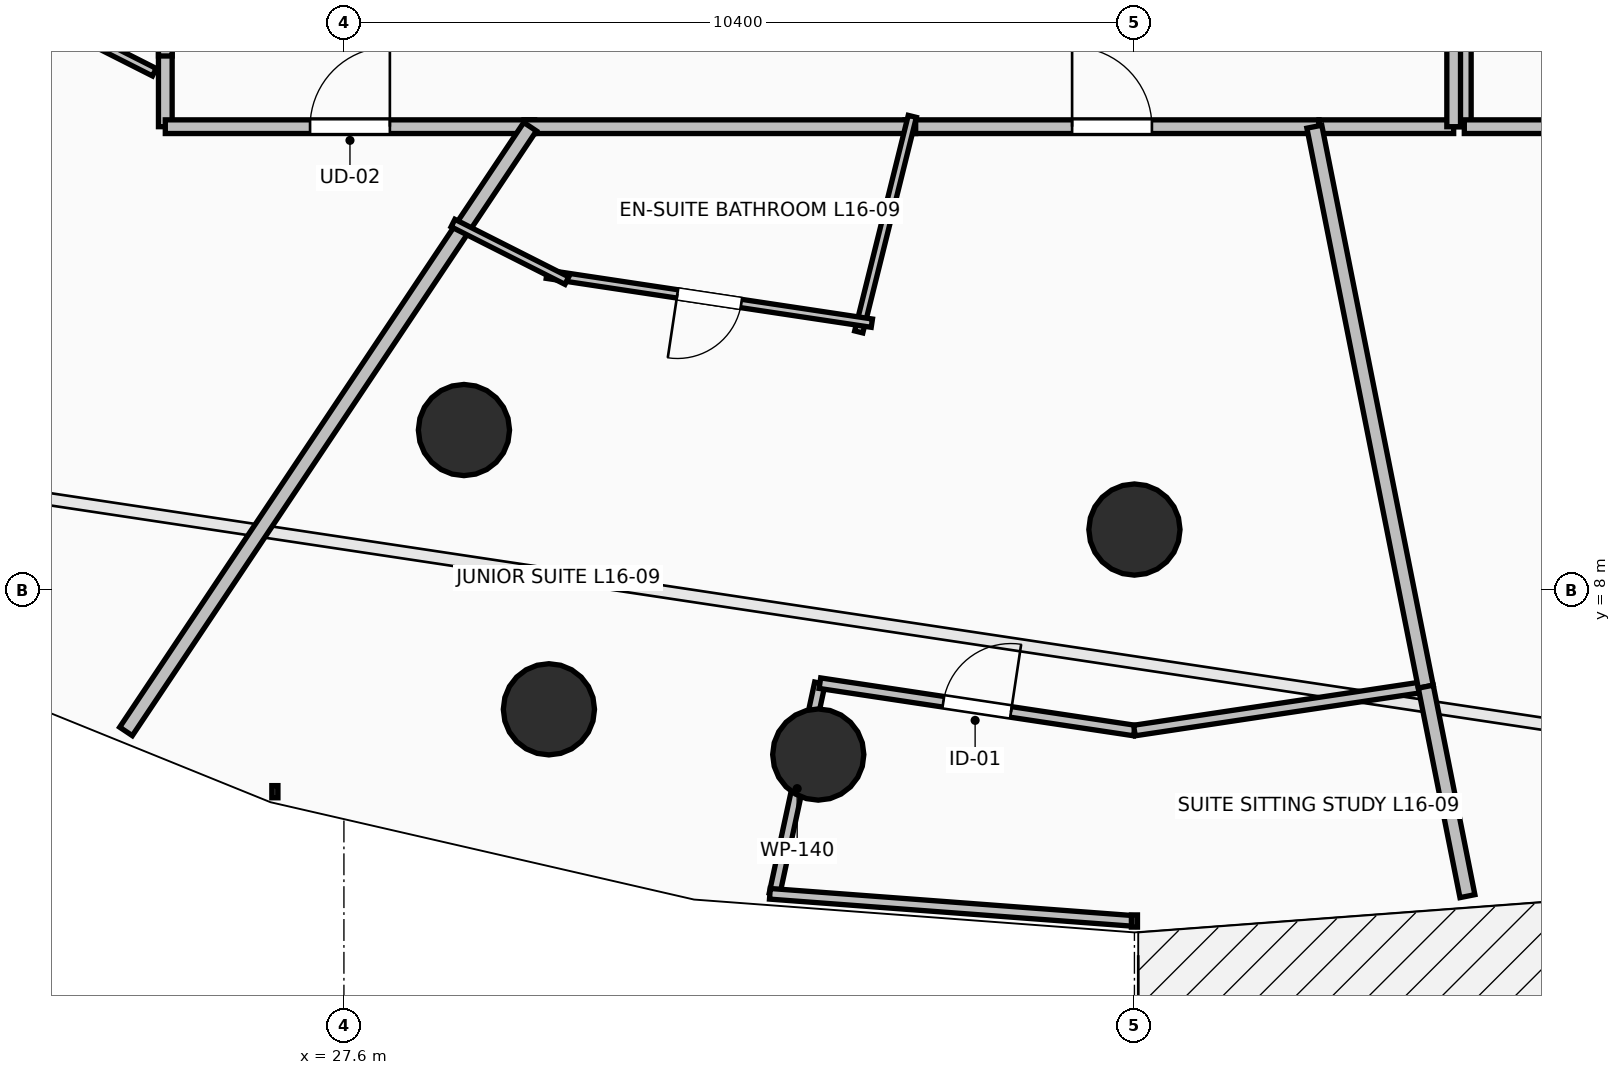
"""IFC4 building model, lengths in metres.
Left out: names, types, materials, properties, quantities, classifications, styles, units other than length and angle.
Written with IfcOpenShell. Run it as: python <this file> out.ifc"""

import sys

from ifc_helpers import new_model, si_unit, direction, frame, frame_2d, origin, origin_2d, place, context, subcontext, project, spatial, rectangle, circle, extrude, element, fill, save


model = new_model("IFC4")
c1 = context("Model", 3, precision=1e-05, world=origin(), true_north=direction((0.0, 1.0)))
c2 = subcontext(c1, "Body", "Model", "MODEL_VIEW")
j1 = project(units=[si_unit("LENGTHUNIT", "METRE"), si_unit("PLANEANGLEUNIT", "RADIAN")], contexts=[c1])
p1 = place(None, origin())
s1 = spatial("IfcSite", under=j1, at=p1, CompositionType="ELEMENT")
p2 = place(p1, origin())
s2 = spatial("IfcBuilding", under=s1, at=p2, CompositionType="ELEMENT")
p3 = place(p2, frame((0.0, 0.0, 62.5)))
s3 = spatial("IfcBuildingStorey", under=s2, at=p3, CompositionType="ELEMENT", Elevation=62.5)
for number, where, z_axis, x_axis in (
    (1, (29.179, 10.109, 0.0), (0.0, 0.0, 1.0), (-0.383, -0.924, 0.0)),
    (2, (38.0, 8.8, 0.0), (0.0, 0.0, 1.0), (0.0, -1.0, 0.0)),
    (3, (30.297, 6.435, 0.0), (0.0, 0.0, 1.0), (-0.383, -0.924, 0.0)),
    (4, (33.84, 5.84, 0.0), (0.0, 0.0, 1.0), (0.0, -1.0, 0.0)),
):
    element("IfcColumn", number, at=place(p3, frame(where, z_axis=z_axis, x_axis=x_axis)), inside=s3, PredefinedType="COLUMN", context=c2, shape_type="SweptSolid", body=[
        extrude(circle(Radius=0.6, at=origin_2d()), origin(), (0.0, 0.0, 1.0), 3.5),
    ])
p4 = place(p3, frame((25.25, 15.17, 0.0), z_axis=(0.0, 0.0, 1.0), x_axis=(0.0, -1.0, 0.0)))
e5 = element("IfcWall", 5, at=p4, inside=s3, PredefinedType="PARTITIONING", context=c2, shape_type="SweptSolid", body=[
    extrude(rectangle(XDim=1.07, YDim=0.18, at=frame_2d((0.535, 0.0))), origin(), (0.0, 0.0, 1.0), 2.874),
])
p5 = place(p3, frame((25.25, 14.1, 0.0), z_axis=(0.0, 0.0, 1.0), x_axis=(1.0, 0.0, 0.0)))
e6 = element("IfcWall", 6, at=p5, inside=s3, PredefinedType="PARTITIONING", context=c2, shape_type="SweptSolid", body=[
    extrude(rectangle(XDim=4.859, YDim=0.18, at=frame_2d((2.429, 0.0))), origin(), (0.0, 0.0, 1.0), 2.432),
])
p6 = place(p5, frame((1.905, 0.0, 0.0)))
e7 = element("IfcOpeningElement", 7, at=p6, cuts=e6, PredefinedType="OPENING", context=c2, shape_type="SweptSolid", body=[
    extrude(rectangle(XDim=1.05, YDim=2.2, at=frame_2d((0.525, 1.1))), frame((0.0, 0.105, 0.0), z_axis=(0.0, -1.0, 0.0), x_axis=(1.0, 0.0, 0.0)), (0.0, 0.0, 1.0), 0.21),
])
p7 = place(p3, frame((25.25, 19.257, 0.0), z_axis=(0.0, 0.0, 1.0), x_axis=(0.0, -1.0, 0.0)))
e8 = element("IfcWall", 8, at=p7, inside=s3, PredefinedType="PARTITIONING", context=c2, shape_type="SweptSolid", body=[
    extrude(rectangle(XDim=4.227, YDim=0.18, at=frame_2d((2.114, 0.0))), origin(), (0.0, 0.0, 1.0), 2.432),
])
p8 = place(p3, frame((34.982, 14.1, 0.0), z_axis=(0.0, 0.0, 1.0), x_axis=(1.0, 0.0, 0.0)))
e9 = element("IfcWall", 9, at=p8, inside=s3, PredefinedType="PARTITIONING", context=c2, shape_type="SweptSolid", body=[
    extrude(rectangle(XDim=5.446, YDim=0.18, at=frame_2d((2.723, 0.0))), origin(), (0.0, 0.0, 1.0), 3.24),
])
p9 = place(p8, frame((2.198, 0.0, 0.0)))
e10 = element("IfcOpeningElement", 10, at=p9, cuts=e9, PredefinedType="OPENING", context=c2, shape_type="SweptSolid", body=[
    extrude(rectangle(XDim=1.05, YDim=2.2, at=frame_2d((0.525, 1.1))), frame((0.0, 0.105, 0.0), z_axis=(0.0, -1.0, 0.0), x_axis=(1.0, 0.0, 0.0)), (0.0, 0.0, 1.0), 0.21),
])
p10 = place(p3, frame((29.969, 14.1, 0.0), z_axis=(0.0, 0.0, 1.0), x_axis=(1.0, 0.0, 0.0)))
e11 = element("IfcWall", 11, at=p10, inside=s3, PredefinedType="PARTITIONING", context=c2, shape_type="SweptSolid", body=[
    extrude(rectangle(XDim=5.153, YDim=0.18, at=frame_2d((2.577, 0.0))), origin(), (0.0, 0.0, 1.0), 3.24),
])
p11 = place(p3, frame((42.34, 16.24, 0.0), z_axis=(0.0, 0.0, 1.0), x_axis=(0.0, -1.0, 0.0)))
e12 = element("IfcWall", 12, at=p11, inside=s3, PredefinedType="PARTITIONING", context=c2, shape_type="SweptSolid", body=[
    extrude(rectangle(XDim=2.14, YDim=0.18, at=frame_2d((1.07, 0.0))), origin(), (0.0, 0.0, 1.0), 3.24),
])
p12 = place(p3, frame((42.34, 14.1, 0.0), z_axis=(0.0, 0.0, 1.0), x_axis=(1.0, 0.0, 0.0)))
e13 = element("IfcWall", 13, at=p12, inside=s3, PredefinedType="PARTITIONING", context=c2, shape_type="SweptSolid", body=[
    extrude(rectangle(XDim=8.41, YDim=0.18, at=frame_2d((4.205, 0.0))), origin(), (0.0, 0.0, 1.0), 2.432),
])
p13 = place(p12, frame((3.705, 0.0, 0.0)))
e14 = element("IfcOpeningElement", 14, at=p13, cuts=e13, PredefinedType="OPENING", context=c2, shape_type="SweptSolid", body=[
    extrude(rectangle(XDim=1.0, YDim=2.15, at=frame_2d((0.5, 1.075))), frame((0.0, 0.105, 0.0), z_axis=(0.0, -1.0, 0.0), x_axis=(1.0, 0.0, 0.0)), (0.0, 0.0, 1.0), 0.21),
])
p14 = place(p3, frame((40.428, 14.1, 0.0), z_axis=(0.0, 0.0, 1.0), x_axis=(1.0, 0.0, 0.0)))
e15 = element("IfcWall", 15, at=p14, inside=s3, PredefinedType="PARTITIONING", context=c2, shape_type="SweptSolid", body=[
    extrude(rectangle(XDim=1.772, YDim=0.18, at=frame_2d((0.886, 0.0))), origin(), (0.0, 0.0, 1.0), 3.24),
])
p15 = place(p3, frame((42.2, 14.1, 0.0), z_axis=(0.0, 0.0, 1.0), x_axis=(0.0, 1.0, 0.0)))
e16 = element("IfcWall", 16, at=p15, inside=s3, PredefinedType="PARTITIONING", context=c2, shape_type="SweptSolid", body=[
    extrude(rectangle(XDim=2.14, YDim=0.18, at=frame_2d((1.07, 0.0))), origin(), (0.0, 0.0, 1.0), 3.24),
])
p16 = place(p3, frame((25.106, 14.817, 0.0), z_axis=(0.0, 0.0, 1.0), x_axis=(-0.892342346526, 0.451359210161, 0.0)))
e17 = element("IfcWall", 17, at=p16, inside=s3, PredefinedType="PARTITIONING", context=c2, shape_type="SweptSolid", body=[
    extrude(rectangle(XDim=1.412, YDim=0.11, at=frame_2d((0.706, 0.0))), origin(), (0.0, 0.0, 1.0), 2.432),
])
p17 = place(p3, frame((24.733, 6.144, 0.0), z_axis=(0.0, 0.0, 1.0), x_axis=(0.555577192504, 0.831464962082, 0.0)))
e18 = element("IfcWall", 18, at=p17, inside=s3, PredefinedType="PARTITIONING", context=c2, shape_type="SweptSolid", body=[
    extrude(rectangle(XDim=9.569, YDim=0.2, at=frame_2d((4.784, 0.0))), origin(), (0.0, 0.0, 1.0), 2.432),
])
p18 = place(p3, frame((35.078, 14.236, 0.0), z_axis=(0.0, 0.0, 1.0), x_axis=(-0.241139515231, -0.97049046064, 0.0)))
e19 = element("IfcWall", 19, at=p18, inside=s3, PredefinedType="PARTITIONING", context=c2, shape_type="SweptSolid", body=[
    extrude(rectangle(XDim=2.922, YDim=0.11, at=frame_2d((1.461, 0.0))), origin(), (0.0, 0.0, 1.0), 2.874),
])
p19 = place(p3, frame((34.545, 11.515, 0.0), z_axis=(0.0, 0.0, 1.0), x_axis=(-0.98886251361, 0.148831882259, 0.0)))
e20 = element("IfcWall", 20, at=p19, inside=s3, PredefinedType="PARTITIONING", context=c2, shape_type="SweptSolid", body=[
    extrude(rectangle(XDim=4.324, YDim=0.11, at=frame_2d((2.162, 0.0))), origin(), (0.0, 0.0, 1.0), 3.24),
])
p20 = place(p19, frame((1.737, 0.0, 0.0)))
e21 = element("IfcOpeningElement", 21, at=p20, cuts=e20, PredefinedType="OPENING", context=c2, shape_type="SweptSolid", body=[
    extrude(rectangle(XDim=0.85, YDim=2.1, at=frame_2d((0.425, 1.05))), frame((0.0, 0.07, 0.0), z_axis=(0.0, -1.0, 0.0), x_axis=(1.0, 0.0, 0.0)), (0.0, 0.0, 1.0), 0.14),
])
p21 = place(p3, frame((30.533, 12.075, 0.0), z_axis=(0.0, 0.0, 1.0), x_axis=(-0.892352223768, 0.451339682209, 0.0)))
e22 = element("IfcWall", 22, at=p21, inside=s3, PredefinedType="PARTITIONING", context=c2, shape_type="SweptSolid", body=[
    extrude(rectangle(XDim=1.678, YDim=0.11, at=frame_2d((0.839, 0.0))), origin(), (0.0, 0.0, 1.0), 2.874),
])
p22 = place(p3, frame((33.264, 4.004, 0.0), z_axis=(0.0, 0.0, 1.0), x_axis=(0.210697687201, 0.977551269555, 0.0)))
e23 = element("IfcWall", 23, at=p22, inside=s3, PredefinedType="PARTITIONING", context=c2, shape_type="SweptSolid", body=[
    extrude(rectangle(XDim=2.839, YDim=0.14, at=frame_2d((1.419, 0.0))), origin(), (0.0, 0.0, 1.0), 3.24),
])
p23 = place(p3, frame((33.862, 6.779, 0.0), z_axis=(0.0, 0.0, 1.0), x_axis=(0.988853606593, -0.148891049857, 0.0)))
e24 = element("IfcWall", 24, at=p23, inside=s3, PredefinedType="PARTITIONING", context=c2, shape_type="SweptSolid", body=[
    extrude(rectangle(XDim=4.185, YDim=0.14, at=frame_2d((2.092, 0.0))), origin(), (0.0, 0.0, 1.0), 2.432),
])
p24 = place(p23, frame((1.642, 0.0, 0.0)))
e25 = element("IfcOpeningElement", 25, at=p24, cuts=e24, PredefinedType="OPENING", context=c2, shape_type="SweptSolid", body=[
    extrude(rectangle(XDim=0.9, YDim=2.1, at=frame_2d((0.45, 1.05))), frame((0.0, 0.085, 0.0), z_axis=(0.0, -1.0, 0.0), x_axis=(1.0, 0.0, 0.0)), (0.0, 0.0, 1.0), 0.17),
])
p25 = place(p3, frame((38.0, 6.156, 0.0), z_axis=(0.0, 0.0, 1.0), x_axis=(0.988862311426, 0.148833225599, 0.0)))
e26 = element("IfcWall", 26, at=p25, inside=s3, PredefinedType="PARTITIONING", context=c2, shape_type="SweptSolid", body=[
    extrude(rectangle(XDim=3.876, YDim=0.14, at=frame_2d((1.938, 0.0))), origin(), (0.0, 0.0, 1.0), 2.624),
])
p26 = place(p3, frame((33.204, 4.008, 0.0), z_axis=(0.0, 0.0, 1.0), x_axis=(0.99722311136, -0.074471915311, 0.0)))
e27 = element("IfcWall", 27, at=p26, inside=s3, PredefinedType="PARTITIONING", context=c2, shape_type="SweptSolid", body=[
    extrude(rectangle(XDim=4.809, YDim=0.14, at=frame_2d((2.405, 0.0))), origin(), (0.0, 0.0, 1.0), 3.24),
])
p27 = place(p3, frame((41.833, 6.733, 0.0), z_axis=(0.0, 0.0, 1.0), x_axis=(-0.195172247164, 0.980768980921, 0.0)))
e28 = element("IfcWall", 28, at=p27, inside=s3, PredefinedType="PARTITIONING", context=c2, shape_type="SweptSolid", body=[
    extrude(rectangle(XDim=7.512, YDim=0.2, at=frame_2d((3.756, 0.0))), origin(), (0.0, 0.0, 1.0), 2.432),
])
p28 = place(p3, frame((42.381, 3.977, 0.0), z_axis=(0.0, 0.0, 1.0), x_axis=(-0.195063341769, 0.980790646722, 0.0)))
e29 = element("IfcWall", 29, at=p28, inside=s3, PredefinedType="PARTITIONING", context=c2, shape_type="SweptSolid", body=[
    extrude(rectangle(XDim=2.81, YDim=0.2, at=frame_2d((1.405, 0.0))), origin(), (0.0, 0.0, 1.0), 2.624),
])
p29 = place(p6, origin())
e30 = element("IfcDoor", 30, at=p29, inside=s3, OperationType="SINGLE_SWING_RIGHT", PredefinedType="DOOR", context=c2, shape_type="SweptSolid", body=[
    extrude(rectangle(XDim=1.05, YDim=2.2, at=frame_2d((0.525, 1.1))), frame((0.0, 0.025, 0.0), z_axis=(0.0, -1.0, 0.0), x_axis=(1.0, 0.0, 0.0)), (0.0, 0.0, 1.0), 0.05),
])
fill(e7, e30)
p30 = place(p9, origin())
e31 = element("IfcDoor", 31, at=p30, inside=s3, OperationType="SINGLE_SWING_LEFT", PredefinedType="DOOR", context=c2, shape_type="SweptSolid", body=[
    extrude(rectangle(XDim=1.05, YDim=2.2, at=frame_2d((0.525, 1.1))), frame((0.0, 0.025, 0.0), z_axis=(0.0, -1.0, 0.0), x_axis=(1.0, 0.0, 0.0)), (0.0, 0.0, 1.0), 0.05),
])
fill(e10, e31)
p31 = place(p20, origin())
e32 = element("IfcDoor", 32, at=p31, inside=s3, OperationType="SINGLE_SWING_RIGHT", PredefinedType="DOOR", context=c2, shape_type="SweptSolid", body=[
    extrude(rectangle(XDim=0.85, YDim=2.1, at=frame_2d((0.425, 1.05))), frame((0.0, 0.025, 0.0), z_axis=(0.0, -1.0, 0.0), x_axis=(1.0, 0.0, 0.0)), (0.0, 0.0, 1.0), 0.05),
])
fill(e21, e32)
p32 = place(p24, origin())
e33 = element("IfcDoor", 33, at=p32, inside=s3, OperationType="SINGLE_SWING_RIGHT", PredefinedType="DOOR", context=c2, shape_type="SweptSolid", body=[
    extrude(rectangle(XDim=0.9, YDim=2.1, at=frame_2d((0.45, 1.05))), frame((0.0, 0.025, 0.0), z_axis=(0.0, -1.0, 0.0), x_axis=(1.0, 0.0, 0.0)), (0.0, 0.0, 1.0), 0.05),
])
fill(e25, e33)
save(model, sys.argv[1])
